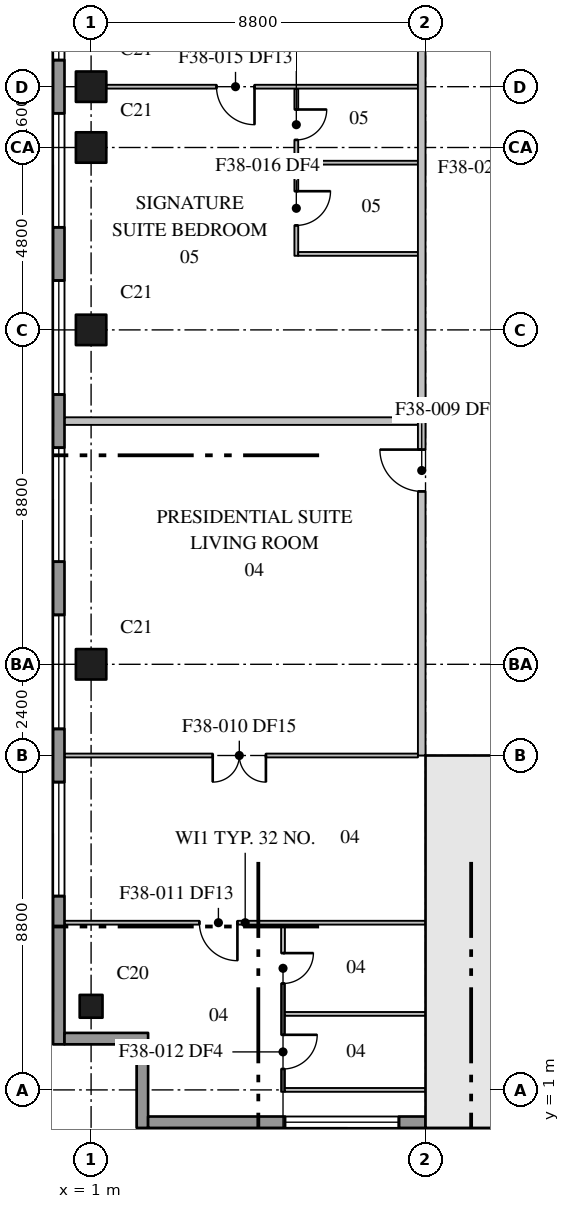
"""IFC4 building model, lengths in metres.
Left out: names, types, materials, properties, quantities, classifications, styles, units other than length and angle.
Written with IfcOpenShell. Run it as: python <this file> out.ifc"""

import sys

from ifc_helpers import new_model, si_unit, direction, frame, frame_2d, origin, origin_2d, place, context, subcontext, project, spatial, rectangle, extrude, element, fill, save


model = new_model("IFC4")
c1 = context("Model", 3, precision=1e-05, world=origin(), true_north=direction((0.0, 1.0)))
c2 = subcontext(c1, "Body", "Model", "MODEL_VIEW")
j1 = project(units=[si_unit("LENGTHUNIT", "METRE"), si_unit("PLANEANGLEUNIT", "RADIAN")], contexts=[c1])
p1 = place(None, origin())
s1 = spatial("IfcSite", under=j1, at=p1, CompositionType="ELEMENT")
p2 = place(p1, origin())
s2 = spatial("IfcBuilding", under=s1, at=p2, CompositionType="ELEMENT")
p3 = place(p2, frame((0.0, 0.0, 305.5)))
s3 = spatial("IfcBuildingStorey", under=s2, at=p3, CompositionType="ELEMENT", Elevation=305.5)
p4 = place(p3, frame((1.0, 3.2, 0.0), z_axis=(0.0, 0.0, 1.0), x_axis=(1.0, 0.0, 0.0)))
e1 = element("IfcColumn", 1, at=p4, inside=s3, PredefinedType="COLUMN", context=c2, shape_type="SweptSolid", body=[
    extrude(rectangle(XDim=0.6, YDim=0.6, at=origin_2d()), origin(), (0.0, 0.0, 1.0), 3.7),
])
for number, where, z_axis, x_axis in (
    (2, (1.0, 12.2, 0.0), (0.0, 0.0, 1.0), (1.0, 0.0, 0.0)),
    (3, (1.0, 21.0, 0.0), (0.0, 0.0, 1.0), (1.0, 0.0, 0.0)),
    (4, (1.0, 25.8, 0.0), (0.0, 0.0, 1.0), (1.0, 0.0, 0.0)),
    (5, (1.0, 27.4, 0.0), (0.0, 0.0, 1.0), (1.0, 0.0, 0.0)),
):
    element("IfcColumn", number, at=place(p3, frame(where, z_axis=z_axis, x_axis=x_axis)), inside=s3, PredefinedType="COLUMN", context=c2, shape_type="SweptSolid", body=[
        extrude(rectangle(XDim=0.8, YDim=0.8, at=origin_2d()), origin(), (0.0, 0.0, 1.0), 3.7),
    ])
p5 = place(p3, frame((9.8, 0.95, 0.0), z_axis=(0.0, 0.0, 1.0), x_axis=(1.0, 0.0, 0.0)))
e6 = element("IfcWall", 6, at=p5, inside=s3, PredefinedType="SHEAR", context=c2, shape_type="SweptSolid", body=[
    extrude(rectangle(XDim=35.2, YDim=0.5, at=frame_2d((17.6, 0.0))), origin(), (0.0, 0.0, 1.0), 3.7),
])
p6 = place(p3, frame((10.75, 1.2, 0.0), z_axis=(0.0, 0.0, 1.0), x_axis=(0.0, 1.0, 0.0)))
e7 = element("IfcWall", 7, at=p6, inside=s3, PredefinedType="SHEAR", context=c2, shape_type="SweptSolid", body=[
    extrude(rectangle(XDim=8.6, YDim=0.5, at=frame_2d((4.3, 0.0))), origin(), (0.0, 0.0, 1.0), 3.7),
])
p7 = place(p3, frame((9.8, 9.6, 0.0), z_axis=(0.0, 0.0, 1.0), x_axis=(1.0, 0.0, 0.0)))
e8 = element("IfcWall", 8, at=p7, inside=s3, PredefinedType="SHEAR", context=c2, shape_type="SweptSolid", body=[
    extrude(rectangle(XDim=4.3, YDim=0.4, at=frame_2d((2.15, 0.0))), origin(), (0.0, 0.0, 1.0), 3.7),
])
p8 = place(p7, frame((2.05, 0.0, 0.0)))
e9 = element("IfcOpeningElement", 9, at=p8, cuts=e8, PredefinedType="OPENING", context=c2, shape_type="SweptSolid", body=[
    extrude(rectangle(XDim=1.2, YDim=2.1, at=frame_2d((0.6, 1.05))), frame((0.0, 0.21, 0.0), z_axis=(0.0, -1.0, 0.0), x_axis=(1.0, 0.0, 0.0)), (0.0, 0.0, 1.0), 0.42),
])
p9 = place(p3, frame((0.15, 61.1, 0.0), z_axis=(0.0, 0.0, 1.0), x_axis=(0.0, -1.0, 0.0)))
e10 = element("IfcWall", 10, at=p9, inside=s3, PredefinedType="STANDARD", context=c2, shape_type="SweptSolid", body=[
    extrude(rectangle(XDim=58.9, YDim=0.3, at=frame_2d((29.45, 0.0))), origin(), (0.0, 0.0, 1.0), 3.25),
])
p10 = place(p9, frame((3.6, 0.0, 0.75)))
e11 = element("IfcOpeningElement", 11, at=p10, cuts=e10, PredefinedType="OPENING", context=c2, shape_type="SweptSolid", body=[
    extrude(rectangle(XDim=3.0, YDim=2.3, at=frame_2d((1.5, 1.15))), frame((0.0, 0.16, 0.0), z_axis=(0.0, -1.0, 0.0), x_axis=(1.0, 0.0, 0.0)), (0.0, 0.0, 1.0), 0.32),
])
p11 = place(p9, frame((8.0, 0.0, 0.75)))
e12 = element("IfcOpeningElement", 12, at=p11, cuts=e10, PredefinedType="OPENING", context=c2, shape_type="SweptSolid", body=[
    extrude(rectangle(XDim=3.0, YDim=2.3, at=frame_2d((1.5, 1.15))), frame((0.0, 0.16, 0.0), z_axis=(0.0, -1.0, 0.0), x_axis=(1.0, 0.0, 0.0)), (0.0, 0.0, 1.0), 0.32),
])
p12 = place(p9, frame((12.4, 0.0, 0.75)))
e13 = element("IfcOpeningElement", 13, at=p12, cuts=e10, PredefinedType="OPENING", context=c2, shape_type="SweptSolid", body=[
    extrude(rectangle(XDim=3.0, YDim=2.3, at=frame_2d((1.5, 1.15))), frame((0.0, 0.16, 0.0), z_axis=(0.0, -1.0, 0.0), x_axis=(1.0, 0.0, 0.0)), (0.0, 0.0, 1.0), 0.32),
])
p13 = place(p9, frame((16.8, 0.0, 0.75)))
e14 = element("IfcOpeningElement", 14, at=p13, cuts=e10, PredefinedType="OPENING", context=c2, shape_type="SweptSolid", body=[
    extrude(rectangle(XDim=3.0, YDim=2.3, at=frame_2d((1.5, 1.15))), frame((0.0, 0.16, 0.0), z_axis=(0.0, -1.0, 0.0), x_axis=(1.0, 0.0, 0.0)), (0.0, 0.0, 1.0), 0.32),
])
p14 = place(p9, frame((21.2, 0.0, 0.75)))
e15 = element("IfcOpeningElement", 15, at=p14, cuts=e10, PredefinedType="OPENING", context=c2, shape_type="SweptSolid", body=[
    extrude(rectangle(XDim=3.0, YDim=2.3, at=frame_2d((1.5, 1.15))), frame((0.0, 0.16, 0.0), z_axis=(0.0, -1.0, 0.0), x_axis=(1.0, 0.0, 0.0)), (0.0, 0.0, 1.0), 0.32),
])
p15 = place(p9, frame((25.6, 0.0, 0.75)))
e16 = element("IfcOpeningElement", 16, at=p15, cuts=e10, PredefinedType="OPENING", context=c2, shape_type="SweptSolid", body=[
    extrude(rectangle(XDim=3.0, YDim=2.3, at=frame_2d((1.5, 1.15))), frame((0.0, 0.16, 0.0), z_axis=(0.0, -1.0, 0.0), x_axis=(1.0, 0.0, 0.0)), (0.0, 0.0, 1.0), 0.32),
])
p16 = place(p9, frame((30.0, 0.0, 0.75)))
e17 = element("IfcOpeningElement", 17, at=p16, cuts=e10, PredefinedType="OPENING", context=c2, shape_type="SweptSolid", body=[
    extrude(rectangle(XDim=3.0, YDim=2.3, at=frame_2d((1.5, 1.15))), frame((0.0, 0.16, 0.0), z_axis=(0.0, -1.0, 0.0), x_axis=(1.0, 0.0, 0.0)), (0.0, 0.0, 1.0), 0.32),
])
p17 = place(p9, frame((34.4, 0.0, 0.75)))
e18 = element("IfcOpeningElement", 18, at=p17, cuts=e10, PredefinedType="OPENING", context=c2, shape_type="SweptSolid", body=[
    extrude(rectangle(XDim=3.0, YDim=2.3, at=frame_2d((1.5, 1.15))), frame((0.0, 0.16, 0.0), z_axis=(0.0, -1.0, 0.0), x_axis=(1.0, 0.0, 0.0)), (0.0, 0.0, 1.0), 0.32),
])
p18 = place(p9, frame((38.8, 0.0, 0.75)))
e19 = element("IfcOpeningElement", 19, at=p18, cuts=e10, PredefinedType="OPENING", context=c2, shape_type="SweptSolid", body=[
    extrude(rectangle(XDim=3.0, YDim=2.3, at=frame_2d((1.5, 1.15))), frame((0.0, 0.16, 0.0), z_axis=(0.0, -1.0, 0.0), x_axis=(1.0, 0.0, 0.0)), (0.0, 0.0, 1.0), 0.32),
])
p19 = place(p9, frame((43.2, 0.0, 0.75)))
e20 = element("IfcOpeningElement", 20, at=p19, cuts=e10, PredefinedType="OPENING", context=c2, shape_type="SweptSolid", body=[
    extrude(rectangle(XDim=3.0, YDim=2.3, at=frame_2d((1.5, 1.15))), frame((0.0, 0.16, 0.0), z_axis=(0.0, -1.0, 0.0), x_axis=(1.0, 0.0, 0.0)), (0.0, 0.0, 1.0), 0.32),
])
p20 = place(p9, frame((47.6, 0.0, 0.75)))
e21 = element("IfcOpeningElement", 21, at=p20, cuts=e10, PredefinedType="OPENING", context=c2, shape_type="SweptSolid", body=[
    extrude(rectangle(XDim=3.0, YDim=2.3, at=frame_2d((1.5, 1.15))), frame((0.0, 0.16, 0.0), z_axis=(0.0, -1.0, 0.0), x_axis=(1.0, 0.0, 0.0)), (0.0, 0.0, 1.0), 0.32),
])
p21 = place(p9, frame((52.0, 0.0, 0.75)))
e22 = element("IfcOpeningElement", 22, at=p21, cuts=e10, PredefinedType="OPENING", context=c2, shape_type="SweptSolid", body=[
    extrude(rectangle(XDim=3.0, YDim=2.3, at=frame_2d((1.5, 1.15))), frame((0.0, 0.16, 0.0), z_axis=(0.0, -1.0, 0.0), x_axis=(1.0, 0.0, 0.0)), (0.0, 0.0, 1.0), 0.32),
])
for number, where, z_axis, x_axis in (
    (23, (0.3, 2.35, 0.0), (0.0, 0.0, 1.0), (1.0, 0.0, 0.0)),
    (24, (2.35, 2.2, 0.0), (0.0, 0.0, 1.0), (0.0, -1.0, 0.0)),
):
    element("IfcWall", number, at=place(p3, frame(where, z_axis=z_axis, x_axis=x_axis)), inside=s3, PredefinedType="STANDARD", context=c2, shape_type="SweptSolid", body=[
        extrude(rectangle(XDim=2.2, YDim=0.3, at=frame_2d((1.1, 0.0))), origin(), (0.0, 0.0, 1.0), 3.25),
    ])
p22 = place(p3, frame((2.5, 0.15, 0.0), z_axis=(0.0, 0.0, 1.0), x_axis=(1.0, 0.0, 0.0)))
e25 = element("IfcWall", 25, at=p22, inside=s3, PredefinedType="STANDARD", context=c2, shape_type="SweptSolid", body=[
    extrude(rectangle(XDim=7.3, YDim=0.3, at=frame_2d((3.65, 0.0))), origin(), (0.0, 0.0, 1.0), 3.25),
])
p23 = place(p22, frame((3.6, 0.0, 0.75)))
e26 = element("IfcOpeningElement", 26, at=p23, cuts=e25, PredefinedType="OPENING", context=c2, shape_type="SweptSolid", body=[
    extrude(rectangle(XDim=3.0, YDim=2.3, at=frame_2d((1.5, 1.15))), frame((0.0, 0.16, 0.0), z_axis=(0.0, -1.0, 0.0), x_axis=(1.0, 0.0, 0.0)), (0.0, 0.0, 1.0), 0.32),
])
p24 = place(p3, frame((9.7, 9.8, 0.0), z_axis=(0.0, 0.0, 1.0), x_axis=(0.0, 1.0, 0.0)))
e27 = element("IfcWall", 27, at=p24, inside=s3, PredefinedType="PARTITIONING", context=c2, shape_type="SweptSolid", body=[
    extrude(rectangle(XDim=48.0, YDim=0.2, at=frame_2d((24.0, 0.0))), origin(), (0.0, 0.0, 1.0), 3.25),
])
p25 = place(p24, frame((6.95, 0.0, 0.0)))
e28 = element("IfcOpeningElement", 28, at=p25, cuts=e27, PredefinedType="OPENING", context=c2, shape_type="SweptSolid", body=[
    extrude(rectangle(XDim=1.1, YDim=2.1, at=frame_2d((0.55, 1.05))), frame((0.0, 0.11, 0.0), z_axis=(0.0, -1.0, 0.0), x_axis=(1.0, 0.0, 0.0)), (0.0, 0.0, 1.0), 0.22),
])
p26 = place(p24, frame((20.15, 0.0, 0.0)))
e29 = element("IfcOpeningElement", 29, at=p26, cuts=e27, PredefinedType="OPENING", context=c2, shape_type="SweptSolid", body=[
    extrude(rectangle(XDim=1.1, YDim=2.1, at=frame_2d((0.55, 1.05))), frame((0.0, 0.11, 0.0), z_axis=(0.0, -1.0, 0.0), x_axis=(1.0, 0.0, 0.0)), (0.0, 0.0, 1.0), 0.22),
])
p27 = place(p24, frame((37.75, 0.0, 0.0)))
e30 = element("IfcOpeningElement", 30, at=p27, cuts=e27, PredefinedType="OPENING", context=c2, shape_type="SweptSolid", body=[
    extrude(rectangle(XDim=1.1, YDim=2.1, at=frame_2d((0.55, 1.05))), frame((0.0, 0.11, 0.0), z_axis=(0.0, -1.0, 0.0), x_axis=(1.0, 0.0, 0.0)), (0.0, 0.0, 1.0), 0.22),
])
p28 = place(p24, frame((41.2, 0.0, 0.0)))
e31 = element("IfcOpeningElement", 31, at=p28, cuts=e27, PredefinedType="OPENING", context=c2, shape_type="SweptSolid", body=[
    extrude(rectangle(XDim=1.1, YDim=2.1, at=frame_2d((0.55, 1.05))), frame((0.0, 0.11, 0.0), z_axis=(0.0, -1.0, 0.0), x_axis=(1.0, 0.0, 0.0)), (0.0, 0.0, 1.0), 0.22),
])
p29 = place(p3, frame((0.31, 18.6, 0.0), z_axis=(0.0, 0.0, 1.0), x_axis=(1.0, 0.0, 0.0)))
e32 = element("IfcWall", 32, at=p29, inside=s3, PredefinedType="PARTITIONING", context=c2, shape_type="SweptSolid", body=[
    extrude(rectangle(XDim=9.29, YDim=0.2, at=frame_2d((4.645, 0.0))), origin(), (0.0, 0.0, 1.0), 3.25),
])
p30 = place(p3, frame((6.05, 5.35, 0.0), z_axis=(0.0, 0.0, 1.0), x_axis=(0.0, -1.0, 0.0)))
e33 = element("IfcWall", 33, at=p30, inside=s3, PredefinedType="PARTITIONING", context=c2, shape_type="SweptSolid", body=[
    extrude(rectangle(XDim=4.4, YDim=0.1, at=frame_2d((2.2, 0.0))), origin(), (0.0, 0.0, 1.0), 3.25),
])
p31 = place(p30, frame((2.9, 0.0, 0.0)))
e34 = element("IfcOpeningElement", 34, at=p31, cuts=e33, PredefinedType="OPENING", context=c2, shape_type="SweptSolid", body=[
    extrude(rectangle(XDim=0.9, YDim=2.1, at=frame_2d((0.45, 1.05))), frame((0.0, 0.06, 0.0), z_axis=(0.0, -1.0, 0.0), x_axis=(1.0, 0.0, 0.0)), (0.0, 0.0, 1.0), 0.12),
])
p32 = place(p30, frame((0.75, 0.0, 0.0)))
e35 = element("IfcOpeningElement", 35, at=p32, cuts=e33, PredefinedType="OPENING", context=c2, shape_type="SweptSolid", body=[
    extrude(rectangle(XDim=0.8, YDim=2.1, at=frame_2d((0.4, 1.05))), frame((0.0, 0.06, 0.0), z_axis=(0.0, -1.0, 0.0), x_axis=(1.0, 0.0, 0.0)), (0.0, 0.0, 1.0), 0.12),
])
p33 = place(p3, frame((9.6, 9.8, 0.0), z_axis=(0.0, 0.0, 1.0), x_axis=(-1.0, 0.0, 0.0)))
e36 = element("IfcWall", 36, at=p33, inside=s3, PredefinedType="PARTITIONING", context=c2, shape_type="SweptSolid", body=[
    extrude(rectangle(XDim=9.29, YDim=0.1, at=frame_2d((4.645, 0.0))), origin(), (0.0, 0.0, 1.0), 3.25),
])
p34 = place(p33, frame((4.0, 0.0, 0.0)))
e37 = element("IfcOpeningElement", 37, at=p34, cuts=e36, PredefinedType="OPENING", context=c2, shape_type="SweptSolid", body=[
    extrude(rectangle(XDim=1.4, YDim=2.1, at=frame_2d((0.7, 1.05))), frame((0.0, 0.06, 0.0), z_axis=(0.0, -1.0, 0.0), x_axis=(1.0, 0.0, 0.0)), (0.0, 0.0, 1.0), 0.12),
])
p35 = place(p3, frame((9.8, 5.4, 0.0), z_axis=(0.0, 0.0, 1.0), x_axis=(-1.0, 0.0, 0.0)))
e38 = element("IfcWall", 38, at=p35, inside=s3, PredefinedType="PARTITIONING", context=c2, shape_type="SweptSolid", body=[
    extrude(rectangle(XDim=9.49, YDim=0.1, at=frame_2d((4.745, 0.0))), origin(), (0.0, 0.0, 1.0), 3.25),
])
p36 = place(p35, frame((4.95, 0.0, 0.0)))
e39 = element("IfcOpeningElement", 39, at=p36, cuts=e38, PredefinedType="OPENING", context=c2, shape_type="SweptSolid", body=[
    extrude(rectangle(XDim=1.0, YDim=2.1, at=frame_2d((0.5, 1.05))), frame((0.0, 0.06, 0.0), z_axis=(0.0, -1.0, 0.0), x_axis=(1.0, 0.0, 0.0)), (0.0, 0.0, 1.0), 0.12),
])
for number, where, z_axis, x_axis in (
    (40, (6.1, 1.0, 0.0), (0.0, 0.0, 1.0), (1.0, 0.0, 0.0)),
    (41, (6.1, 3.0, 0.0), (0.0, 0.0, 1.0), (1.0, 0.0, 0.0)),
):
    element("IfcWall", number, at=place(p3, frame(where, z_axis=z_axis, x_axis=x_axis)), inside=s3, PredefinedType="PARTITIONING", context=c2, shape_type="SweptSolid", body=[
        extrude(rectangle(XDim=3.7, YDim=0.1, at=frame_2d((1.85, 0.0))), origin(), (0.0, 0.0, 1.0), 3.25),
    ])
p37 = place(p3, frame((6.4, 27.35, 0.0), z_axis=(0.0, 0.0, 1.0), x_axis=(0.0, -1.0, 0.0)))
e42 = element("IfcWall", 42, at=p37, inside=s3, PredefinedType="PARTITIONING", context=c2, shape_type="SweptSolid", body=[
    extrude(rectangle(XDim=4.4, YDim=0.1, at=frame_2d((2.2, 0.0))), origin(), (0.0, 0.0, 1.0), 3.25),
])
p38 = place(p37, frame((2.7, 0.0, 0.0)))
e43 = element("IfcOpeningElement", 43, at=p38, cuts=e42, PredefinedType="OPENING", context=c2, shape_type="SweptSolid", body=[
    extrude(rectangle(XDim=0.9, YDim=2.1, at=frame_2d((0.45, 1.05))), frame((0.0, 0.06, 0.0), z_axis=(0.0, -1.0, 0.0), x_axis=(1.0, 0.0, 0.0)), (0.0, 0.0, 1.0), 0.12),
])
p39 = place(p37, frame((0.55, 0.0, 0.0)))
e44 = element("IfcOpeningElement", 44, at=p39, cuts=e42, PredefinedType="OPENING", context=c2, shape_type="SweptSolid", body=[
    extrude(rectangle(XDim=0.8, YDim=2.1, at=frame_2d((0.4, 1.05))), frame((0.0, 0.06, 0.0), z_axis=(0.0, -1.0, 0.0), x_axis=(1.0, 0.0, 0.0)), (0.0, 0.0, 1.0), 0.12),
])
p40 = place(p3, frame((9.6, 27.4, 0.0), z_axis=(0.0, 0.0, 1.0), x_axis=(-1.0, 0.0, 0.0)))
e45 = element("IfcWall", 45, at=p40, inside=s3, PredefinedType="PARTITIONING", context=c2, shape_type="SweptSolid", body=[
    extrude(rectangle(XDim=8.2, YDim=0.1, at=frame_2d((4.1, 0.0))), origin(), (0.0, 0.0, 1.0), 3.25),
])
p41 = place(p40, frame((4.3, 0.0, 0.0)))
e46 = element("IfcOpeningElement", 46, at=p41, cuts=e45, PredefinedType="OPENING", context=c2, shape_type="SweptSolid", body=[
    extrude(rectangle(XDim=1.0, YDim=2.1, at=frame_2d((0.5, 1.05))), frame((0.0, 0.06, 0.0), z_axis=(0.0, -1.0, 0.0), x_axis=(1.0, 0.0, 0.0)), (0.0, 0.0, 1.0), 0.12),
])
for number, where, z_axis, x_axis in (
    (47, (6.45, 23.0, 0.0), (0.0, 0.0, 1.0), (1.0, 0.0, 0.0)),
    (48, (6.45, 25.4, 0.0), (0.0, 0.0, 1.0), (1.0, 0.0, 0.0)),
):
    element("IfcWall", number, at=place(p3, frame(where, z_axis=z_axis, x_axis=x_axis)), inside=s3, PredefinedType="PARTITIONING", context=c2, shape_type="SweptSolid", body=[
        extrude(rectangle(XDim=3.15, YDim=0.1, at=frame_2d((1.575, 0.0))), origin(), (0.0, 0.0, 1.0), 3.25),
    ])
p42 = place(p16, origin())
e49 = element("IfcWindow", 49, at=p42, inside=s3, PartitioningType="SINGLE_PANEL", PredefinedType="WINDOW", context=c2, shape_type="SweptSolid", body=[
    extrude(rectangle(XDim=3.0, YDim=2.3, at=frame_2d((1.5, 1.15))), frame((0.0, 0.03, 0.0), z_axis=(0.0, -1.0, 0.0), x_axis=(1.0, 0.0, 0.0)), (0.0, 0.0, 1.0), 0.06),
])
fill(e17, e49)
p43 = place(p17, origin())
e50 = element("IfcWindow", 50, at=p43, inside=s3, PartitioningType="SINGLE_PANEL", PredefinedType="WINDOW", context=c2, shape_type="SweptSolid", body=[
    extrude(rectangle(XDim=3.0, YDim=2.3, at=frame_2d((1.5, 1.15))), frame((0.0, 0.03, 0.0), z_axis=(0.0, -1.0, 0.0), x_axis=(1.0, 0.0, 0.0)), (0.0, 0.0, 1.0), 0.06),
])
fill(e18, e50)
p44 = place(p18, origin())
e51 = element("IfcWindow", 51, at=p44, inside=s3, PartitioningType="SINGLE_PANEL", PredefinedType="WINDOW", context=c2, shape_type="SweptSolid", body=[
    extrude(rectangle(XDim=3.0, YDim=2.3, at=frame_2d((1.5, 1.15))), frame((0.0, 0.03, 0.0), z_axis=(0.0, -1.0, 0.0), x_axis=(1.0, 0.0, 0.0)), (0.0, 0.0, 1.0), 0.06),
])
fill(e19, e51)
p45 = place(p19, origin())
e52 = element("IfcWindow", 52, at=p45, inside=s3, PartitioningType="SINGLE_PANEL", PredefinedType="WINDOW", context=c2, shape_type="SweptSolid", body=[
    extrude(rectangle(XDim=3.0, YDim=2.3, at=frame_2d((1.5, 1.15))), frame((0.0, 0.03, 0.0), z_axis=(0.0, -1.0, 0.0), x_axis=(1.0, 0.0, 0.0)), (0.0, 0.0, 1.0), 0.06),
])
fill(e20, e52)
p46 = place(p20, origin())
e53 = element("IfcWindow", 53, at=p46, inside=s3, PartitioningType="SINGLE_PANEL", PredefinedType="WINDOW", context=c2, shape_type="SweptSolid", body=[
    extrude(rectangle(XDim=3.0, YDim=2.3, at=frame_2d((1.5, 1.15))), frame((0.0, 0.03, 0.0), z_axis=(0.0, -1.0, 0.0), x_axis=(1.0, 0.0, 0.0)), (0.0, 0.0, 1.0), 0.06),
])
fill(e21, e53)
p47 = place(p21, origin())
e54 = element("IfcWindow", 54, at=p47, inside=s3, PartitioningType="SINGLE_PANEL", PredefinedType="WINDOW", context=c2, shape_type="SweptSolid", body=[
    extrude(rectangle(XDim=3.0, YDim=2.3, at=frame_2d((1.5, 1.15))), frame((0.0, 0.03, 0.0), z_axis=(0.0, -1.0, 0.0), x_axis=(1.0, 0.0, 0.0)), (0.0, 0.0, 1.0), 0.06),
])
fill(e22, e54)
p48 = place(p23, origin())
e55 = element("IfcWindow", 55, at=p48, inside=s3, PartitioningType="SINGLE_PANEL", PredefinedType="WINDOW", context=c2, shape_type="SweptSolid", body=[
    extrude(rectangle(XDim=3.0, YDim=2.3, at=frame_2d((1.5, 1.15))), frame((0.0, 0.03, 0.0), z_axis=(0.0, -1.0, 0.0), x_axis=(1.0, 0.0, 0.0)), (0.0, 0.0, 1.0), 0.06),
])
fill(e26, e55)
p49 = place(p25, origin())
e56 = element("IfcDoor", 56, at=p49, inside=s3, OperationType="SINGLE_SWING_RIGHT", PredefinedType="DOOR", context=c2, shape_type="SweptSolid", body=[
    extrude(rectangle(XDim=1.1, YDim=2.1, at=frame_2d((0.55, 1.05))), frame((0.0, 0.025, 0.0), z_axis=(0.0, -1.0, 0.0), x_axis=(1.0, 0.0, 0.0)), (0.0, 0.0, 1.0), 0.05),
])
fill(e28, e56)
p50 = place(p34, origin())
e57 = element("IfcDoor", 57, at=p50, inside=s3, OperationType="DOUBLE_DOOR_SINGLE_SWING", PredefinedType="DOOR", context=c2, shape_type="SweptSolid", body=[
    extrude(rectangle(XDim=1.4, YDim=2.1, at=frame_2d((0.7, 1.05))), frame((0.0, 0.025, 0.0), z_axis=(0.0, -1.0, 0.0), x_axis=(1.0, 0.0, 0.0)), (0.0, 0.0, 1.0), 0.05),
])
fill(e37, e57)
p51 = place(p36, origin())
e58 = element("IfcDoor", 58, at=p51, inside=s3, OperationType="SINGLE_SWING_LEFT", PredefinedType="DOOR", context=c2, shape_type="SweptSolid", body=[
    extrude(rectangle(XDim=1.0, YDim=2.1, at=frame_2d((0.5, 1.05))), frame((0.0, 0.025, 0.0), z_axis=(0.0, -1.0, 0.0), x_axis=(1.0, 0.0, 0.0)), (0.0, 0.0, 1.0), 0.05),
])
fill(e39, e58)
p52 = place(p31, origin())
e59 = element("IfcDoor", 59, at=p52, inside=s3, OperationType="SINGLE_SWING_LEFT", PredefinedType="DOOR", context=c2, shape_type="SweptSolid", body=[
    extrude(rectangle(XDim=0.9, YDim=2.1, at=frame_2d((0.45, 1.05))), frame((0.0, 0.025, 0.0), z_axis=(0.0, -1.0, 0.0), x_axis=(1.0, 0.0, 0.0)), (0.0, 0.0, 1.0), 0.05),
])
fill(e34, e59)
p53 = place(p32, origin())
e60 = element("IfcDoor", 60, at=p53, inside=s3, OperationType="SINGLE_SWING_LEFT", PredefinedType="DOOR", context=c2, shape_type="SweptSolid", body=[
    extrude(rectangle(XDim=0.8, YDim=2.1, at=frame_2d((0.4, 1.05))), frame((0.0, 0.025, 0.0), z_axis=(0.0, -1.0, 0.0), x_axis=(1.0, 0.0, 0.0)), (0.0, 0.0, 1.0), 0.05),
])
fill(e35, e60)
p54 = place(p41, origin())
e61 = element("IfcDoor", 61, at=p54, inside=s3, OperationType="SINGLE_SWING_LEFT", PredefinedType="DOOR", context=c2, shape_type="SweptSolid", body=[
    extrude(rectangle(XDim=1.0, YDim=2.1, at=frame_2d((0.5, 1.05))), frame((0.0, 0.025, 0.0), z_axis=(0.0, -1.0, 0.0), x_axis=(1.0, 0.0, 0.0)), (0.0, 0.0, 1.0), 0.05),
])
fill(e46, e61)
p55 = place(p38, origin())
e62 = element("IfcDoor", 62, at=p55, inside=s3, OperationType="SINGLE_SWING_LEFT", PredefinedType="DOOR", context=c2, shape_type="SweptSolid", body=[
    extrude(rectangle(XDim=0.9, YDim=2.1, at=frame_2d((0.45, 1.05))), frame((0.0, 0.025, 0.0), z_axis=(0.0, -1.0, 0.0), x_axis=(1.0, 0.0, 0.0)), (0.0, 0.0, 1.0), 0.05),
])
fill(e43, e62)
p56 = place(p39, origin())
e63 = element("IfcDoor", 63, at=p56, inside=s3, OperationType="SINGLE_SWING_LEFT", PredefinedType="DOOR", context=c2, shape_type="SweptSolid", body=[
    extrude(rectangle(XDim=0.8, YDim=2.1, at=frame_2d((0.4, 1.05))), frame((0.0, 0.025, 0.0), z_axis=(0.0, -1.0, 0.0), x_axis=(1.0, 0.0, 0.0)), (0.0, 0.0, 1.0), 0.05),
])
fill(e44, e63)
save(model, sys.argv[1])
